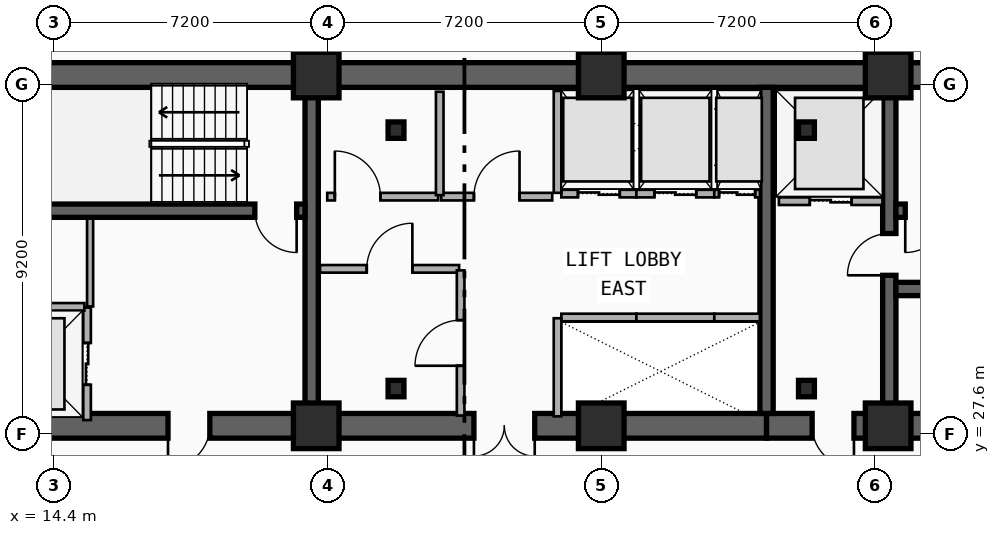
"""IFC4 building model, lengths in metres.
Left out: names, types, materials, properties, quantities, classifications, styles, units other than length and angle.
Written with IfcOpenShell. Run it as: python <this file> out.ifc"""

import sys

from ifc_helpers import new_model, si_unit, direction, frame, frame_2d, origin, origin_2d, place, context, subcontext, project, spatial, rectangle, i_section, extrude, element, fill, save


model = new_model("IFC4")
c1 = context("Model", 3, precision=1e-05, world=origin(), true_north=direction((0.0, 1.0)))
c2 = subcontext(c1, "Body", "Model", "MODEL_VIEW")
j1 = project(units=[si_unit("LENGTHUNIT", "METRE"), si_unit("PLANEANGLEUNIT", "RADIAN")], contexts=[c1])
p1 = place(None, origin())
s1 = spatial("IfcSite", under=j1, at=p1, CompositionType="ELEMENT")
p2 = place(p1, origin())
s2 = spatial("IfcBuilding", under=s1, at=p2, CompositionType="ELEMENT")
p3 = place(p2, frame((0.0, 0.0, 122.3)))
s3 = spatial("IfcBuildingStorey", under=s2, at=p3, CompositionType="ELEMENT", Elevation=122.3)
p4 = place(p3, frame((12.15, 37.05, 0.0), z_axis=(0.0, 0.0, 1.0), x_axis=(1.0, 0.0, 0.0)))
e1 = element("IfcWall", 1, at=p4, inside=s3, PredefinedType="SHEAR", context=c2, shape_type="SweptSolid", body=[
    extrude(rectangle(XDim=33.23, YDim=0.65, at=frame_2d((16.615, 0.0))), origin(), (0.0, 0.0, 1.0), 3.5),
])
p5 = place(p3, frame((21.18, 27.82, 0.0), z_axis=(0.0, 0.0, 1.0), x_axis=(-1.0, 0.0, 0.0)))
e2 = element("IfcWall", 2, at=p5, inside=s3, PredefinedType="SHEAR", context=c2, shape_type="SweptSolid", body=[
    extrude(rectangle(XDim=9.03, YDim=0.65, at=frame_2d((4.515, 0.0))), origin(), (0.0, 0.0, 1.0), 3.5),
])
p6 = place(p5, frame((2.68, 0.0, 0.0)))
e3 = element("IfcOpeningElement", 3, at=p6, cuts=e2, PredefinedType="OPENING", context=c2, shape_type="SweptSolid", body=[
    extrude(rectangle(XDim=1.1, YDim=2.15, at=frame_2d((0.55, 1.075))), frame((0.0, 0.335, 0.0), z_axis=(0.0, -1.0, 0.0), x_axis=(1.0, 0.0, 0.0)), (0.0, 0.0, 1.0), 0.67),
])
p7 = place(p3, frame((33.15, 27.82, 0.0), z_axis=(0.0, 0.0, 1.0), x_axis=(-1.0, 0.0, 0.0)))
e4 = element("IfcWall", 4, at=p7, inside=s3, PredefinedType="SHEAR", context=c2, shape_type="SweptSolid", body=[
    extrude(rectangle(XDim=11.97, YDim=0.65, at=frame_2d((5.985, 0.0))), origin(), (0.0, 0.0, 1.0), 3.5),
])
p8 = place(p7, frame((6.1, 0.0, 0.0)))
e5 = element("IfcOpeningElement", 5, at=p8, cuts=e4, PredefinedType="OPENING", context=c2, shape_type="SweptSolid", body=[
    extrude(rectangle(XDim=1.6, YDim=2.2, at=frame_2d((0.8, 1.1))), frame((0.0, 0.335, 0.0), z_axis=(0.0, -1.0, 0.0), x_axis=(1.0, 0.0, 0.0)), (0.0, 0.0, 1.0), 0.67),
])
p9 = place(p3, frame((45.38, 27.82, 0.0), z_axis=(0.0, 0.0, 1.0), x_axis=(-1.0, 0.0, 0.0)))
e6 = element("IfcWall", 6, at=p9, inside=s3, PredefinedType="SHEAR", context=c2, shape_type="SweptSolid", body=[
    extrude(rectangle(XDim=12.23, YDim=0.65, at=frame_2d((6.115, 0.0))), origin(), (0.0, 0.0, 1.0), 3.5),
])
p10 = place(p9, frame((9.93, 0.0, 0.0)))
e7 = element("IfcOpeningElement", 7, at=p10, cuts=e6, PredefinedType="OPENING", context=c2, shape_type="SweptSolid", body=[
    extrude(rectangle(XDim=1.1, YDim=2.15, at=frame_2d((0.55, 1.075))), frame((0.0, 0.335, 0.0), z_axis=(0.0, -1.0, 0.0), x_axis=(1.0, 0.0, 0.0)), (0.0, 0.0, 1.0), 0.67),
])
p11 = place(p9, frame((6.23, 0.0, 0.0)))
e8 = element("IfcOpeningElement", 8, at=p11, cuts=e6, PredefinedType="OPENING", context=c2, shape_type="SweptSolid", body=[
    extrude(rectangle(XDim=1.1, YDim=2.15, at=frame_2d((0.55, 1.075))), frame((0.0, 0.335, 0.0), z_axis=(0.0, -1.0, 0.0), x_axis=(1.0, 0.0, 0.0)), (0.0, 0.0, 1.0), 0.67),
])
for number, where, z_axis, x_axis in (
    (9, (21.18, 28.145, 0.0), (0.0, 0.0, 1.0), (0.0, 1.0, 0.0)),
    (10, (33.15, 28.145, 0.0), (0.0, 0.0, 1.0), (0.0, 1.0, 0.0)),
):
    element("IfcWall", number, at=place(p3, frame(where, z_axis=z_axis, x_axis=x_axis)), inside=s3, PredefinedType="SHEAR", context=c2, shape_type="SweptSolid", body=[
        extrude(rectangle(XDim=8.58, YDim=0.35, at=frame_2d((4.29, 0.0))), origin(), (0.0, 0.0, 1.0), 3.5),
    ])
p12 = place(p3, frame((36.38, 28.145, 0.0), z_axis=(0.0, 0.0, 1.0), x_axis=(0.0, 1.0, 0.0)))
e11 = element("IfcWall", 11, at=p12, inside=s3, PredefinedType="SHEAR", context=c2, shape_type="SweptSolid", body=[
    extrude(rectangle(XDim=8.58, YDim=0.35, at=frame_2d((4.29, 0.0))), origin(), (0.0, 0.0, 1.0), 3.5),
])
p13 = place(p12, frame((3.635, 0.0, 0.0)))
e12 = element("IfcOpeningElement", 12, at=p13, cuts=e11, PredefinedType="OPENING", context=c2, shape_type="SweptSolid", body=[
    extrude(rectangle(XDim=1.1, YDim=2.15, at=frame_2d((0.55, 1.075))), frame((0.0, 0.185, 0.0), z_axis=(0.0, -1.0, 0.0), x_axis=(1.0, 0.0, 0.0)), (0.0, 0.0, 1.0), 0.37),
])
p14 = place(p3, frame((21.005, 33.48, 0.0), z_axis=(0.0, 0.0, 1.0), x_axis=(-1.0, 0.0, 0.0)))
e13 = element("IfcWall", 13, at=p14, inside=s3, PredefinedType="SHEAR", context=c2, shape_type="SweptSolid", body=[
    extrude(rectangle(XDim=8.53, YDim=0.35, at=frame_2d((4.265, 0.0))), origin(), (0.0, 0.0, 1.0), 3.5),
])
p15 = place(p14, frame((0.22, 0.0, 0.0)))
e14 = element("IfcOpeningElement", 14, at=p15, cuts=e13, PredefinedType="OPENING", context=c2, shape_type="SweptSolid", body=[
    extrude(rectangle(XDim=1.1, YDim=2.15, at=frame_2d((0.55, 1.075))), frame((0.0, 0.185, 0.0), z_axis=(0.0, -1.0, 0.0), x_axis=(1.0, 0.0, 0.0)), (0.0, 0.0, 1.0), 0.37),
])
p16 = place(p3, frame((45.055, 33.48, 0.0), z_axis=(0.0, 0.0, 1.0), x_axis=(-1.0, 0.0, 0.0)))
e15 = element("IfcWall", 15, at=p16, inside=s3, PredefinedType="SHEAR", context=c2, shape_type="SweptSolid", body=[
    extrude(rectangle(XDim=8.5, YDim=0.35, at=frame_2d((4.25, 0.0))), origin(), (0.0, 0.0, 1.0), 3.5),
])
p17 = place(p16, frame((7.155, 0.0, 0.0)))
e16 = element("IfcOpeningElement", 16, at=p17, cuts=e15, PredefinedType="OPENING", context=c2, shape_type="SweptSolid", body=[
    extrude(rectangle(XDim=1.1, YDim=2.15, at=frame_2d((0.55, 1.075))), frame((0.0, 0.185, 0.0), z_axis=(0.0, -1.0, 0.0), x_axis=(1.0, 0.0, 0.0)), (0.0, 0.0, 1.0), 0.37),
])
p18 = place(p3, frame((36.555, 31.42, 0.0), z_axis=(0.0, 0.0, 1.0), x_axis=(1.0, 0.0, 0.0)))
e17 = element("IfcWall", 17, at=p18, inside=s3, PredefinedType="SHEAR", context=c2, shape_type="SweptSolid", body=[
    extrude(rectangle(XDim=8.5, YDim=0.35, at=frame_2d((4.25, 0.0))), origin(), (0.0, 0.0, 1.0), 3.5),
])
for number, where, z_axis, x_axis in (
    (18, (23.4, 28.8, 0.0), (0.0, 0.0, 1.0), (1.0, 0.0, 0.0)),
    (19, (34.2, 28.8, 0.0), (0.0, 0.0, 1.0), (1.0, 0.0, 0.0)),
    (20, (34.2, 35.6, 0.0), (0.0, 0.0, 1.0), (1.0, 0.0, 0.0)),
    (21, (23.4, 35.6, 0.0), (0.0, 0.0, 1.0), (1.0, 0.0, 0.0)),
):
    element("IfcColumn", number, at=place(p3, frame(where, z_axis=z_axis, x_axis=x_axis)), inside=s3, PredefinedType="COLUMN", context=c2, shape_type="SweptSolid", body=[
        extrude(i_section(OverallWidth=0.418, OverallDepth=0.432, WebThickness=0.035, FlangeThickness=0.056, FilletRadius=0.015, at=origin_2d()), origin(), (0.0, 0.0, 1.0), 3.5),
    ])
for number, where, z_axis, x_axis in (
    (22, (21.3, 27.82, 0.0), (0.0, 0.0, 1.0), (1.0, 0.0, 0.0)),
    (23, (21.3, 37.05, 0.0), (0.0, 0.0, 1.0), (1.0, 0.0, 0.0)),
    (24, (28.8, 27.82, 0.0), (0.0, 0.0, 1.0), (1.0, 0.0, 0.0)),
    (25, (28.8, 37.05, 0.0), (0.0, 0.0, 1.0), (1.0, 0.0, 0.0)),
    (26, (36.35, 27.82, 0.0), (0.0, 0.0, 1.0), (1.0, 0.0, 0.0)),
    (27, (36.35, 37.05, 0.0), (0.0, 0.0, 1.0), (1.0, 0.0, 0.0)),
):
    element("IfcColumn", number, at=place(p3, frame(where, z_axis=z_axis, x_axis=x_axis)), inside=s3, PredefinedType="COLUMN", context=c2, shape_type="SweptSolid", body=[
        extrude(rectangle(XDim=1.2, YDim=1.2, at=origin_2d()), origin(), (0.0, 0.0, 1.0), 3.5),
    ])
p19 = place(p3, frame((15.27, 27.97, 0.0), z_axis=(0.0, 0.0, 1.0), x_axis=(0.0, 1.0, 0.0)))
e28 = element("IfcWall", 28, at=p19, inside=s3, PredefinedType="PARTITIONING", context=c2, shape_type="SweptSolid", body=[
    extrude(rectangle(XDim=2.96, YDim=0.2, at=frame_2d((1.48, 0.0))), origin(), (0.0, 0.0, 1.0), 2.212),
])
p20 = place(p19, frame((0.93, 0.0, 0.0)))
e29 = element("IfcOpeningElement", 29, at=p20, cuts=e28, PredefinedType="OPENING", context=c2, shape_type="SweptSolid", body=[
    extrude(rectangle(XDim=1.1, YDim=2.15, at=frame_2d((0.55, 1.075))), frame((0.0, 0.11, 0.0), z_axis=(0.0, -1.0, 0.0), x_axis=(1.0, 0.0, 0.0)), (0.0, 0.0, 1.0), 0.22),
])
p21 = place(p3, frame((12.45, 30.95, 0.0), z_axis=(0.0, 0.0, 1.0), x_axis=(1.0, 0.0, 0.0)))
e30 = element("IfcWall", 30, at=p21, inside=s3, PredefinedType="PARTITIONING", context=c2, shape_type="SweptSolid", body=[
    extrude(rectangle(XDim=2.75, YDim=0.2, at=frame_2d((1.375, 0.0))), origin(), (0.0, 0.0, 1.0), 2.212),
])
p22 = place(p3, frame((33.475, 33.73, 0.0), z_axis=(0.0, 0.0, 1.0), x_axis=(1.0, 0.0, 0.0)))
e31 = element("IfcWall", 31, at=p22, inside=s3, PredefinedType="PARTITIONING", context=c2, shape_type="SweptSolid", body=[
    extrude(rectangle(XDim=2.725, YDim=0.2, at=frame_2d((1.362, 0.0))), origin(), (0.0, 0.0, 1.0), 2.212),
])
p23 = place(p22, frame((0.812, 0.0, 0.0)))
e32 = element("IfcOpeningElement", 32, at=p23, cuts=e31, PredefinedType="OPENING", context=c2, shape_type="SweptSolid", body=[
    extrude(rectangle(XDim=1.1, YDim=2.15, at=frame_2d((0.55, 1.075))), frame((0.0, 0.11, 0.0), z_axis=(0.0, -1.0, 0.0), x_axis=(1.0, 0.0, 0.0)), (0.0, 0.0, 1.0), 0.22),
])
p24 = place(p3, frame((27.75, 30.67, 0.0), z_axis=(0.0, 0.0, 1.0), x_axis=(1.0, 0.0, 0.0)))
e33 = element("IfcWall", 33, at=p24, inside=s3, PredefinedType="PARTITIONING", context=c2, shape_type="SweptSolid", body=[
    extrude(rectangle(XDim=1.975, YDim=0.2, at=frame_2d((0.988, 0.0))), origin(), (0.0, 0.0, 1.0), 2.212),
])
p25 = place(p3, frame((27.65, 28.07, 0.0), z_axis=(0.0, 0.0, 1.0), x_axis=(0.0, 1.0, 0.0)))
e34 = element("IfcWall", 34, at=p25, inside=s3, PredefinedType="PARTITIONING", context=c2, shape_type="SweptSolid", body=[
    extrude(rectangle(XDim=2.58, YDim=0.2, at=frame_2d((1.29, 0.0))), origin(), (0.0, 0.0, 1.0), 2.212),
])
p26 = place(p3, frame((29.725, 30.67, 0.0), z_axis=(0.0, 0.0, 1.0), x_axis=(1.0, 0.0, 0.0)))
e35 = element("IfcWall", 35, at=p26, inside=s3, PredefinedType="PARTITIONING", context=c2, shape_type="SweptSolid", body=[
    extrude(rectangle(XDim=2.05, YDim=0.2, at=frame_2d((1.025, 0.0))), origin(), (0.0, 0.0, 1.0), 2.62),
])
p27 = place(p3, frame((31.775, 30.67, 0.0), z_axis=(0.0, 0.0, 1.0), x_axis=(1.0, 0.0, 0.0)))
e36 = element("IfcWall", 36, at=p27, inside=s3, PredefinedType="PARTITIONING", context=c2, shape_type="SweptSolid", body=[
    extrude(rectangle(XDim=1.2, YDim=0.2, at=frame_2d((0.6, 0.0))), origin(), (0.0, 0.0, 1.0), 2.62),
])
p28 = place(p3, frame((27.75, 33.93, 0.0), z_axis=(0.0, 0.0, 1.0), x_axis=(1.0, 0.0, 0.0)))
e37 = element("IfcWall", 37, at=p28, inside=s3, PredefinedType="PARTITIONING", context=c2, shape_type="SweptSolid", body=[
    extrude(rectangle(XDim=1.975, YDim=0.2, at=frame_2d((0.988, 0.0))), origin(), (0.0, 0.0, 1.0), 2.212),
])
p29 = place(p28, frame((0.438, 0.0, 0.0)))
e38 = element("IfcOpeningElement", 38, at=p29, cuts=e37, PredefinedType="OPENING", context=c2, shape_type="SweptSolid", body=[
    extrude(rectangle(XDim=1.1, YDim=2.15, at=frame_2d((0.55, 1.075))), frame((0.0, 0.11, 0.0), z_axis=(0.0, -1.0, 0.0), x_axis=(1.0, 0.0, 0.0)), (0.0, 0.0, 1.0), 0.22),
])
p30 = place(p3, frame((27.65, 33.95, 0.0), z_axis=(0.0, 0.0, 1.0), x_axis=(0.0, 1.0, 0.0)))
e39 = element("IfcWall", 39, at=p30, inside=s3, PredefinedType="PARTITIONING", context=c2, shape_type="SweptSolid", body=[
    extrude(rectangle(XDim=2.68, YDim=0.2, at=frame_2d((1.34, 0.0))), origin(), (0.0, 0.0, 1.0), 2.212),
])
p31 = place(p3, frame((29.725, 33.93, 0.0), z_axis=(0.0, 0.0, 1.0), x_axis=(1.0, 0.0, 0.0)))
e40 = element("IfcWall", 40, at=p31, inside=s3, PredefinedType="PARTITIONING", context=c2, shape_type="SweptSolid", body=[
    extrude(rectangle(XDim=2.05, YDim=0.2, at=frame_2d((1.025, 0.0))), origin(), (0.0, 0.0, 1.0), 3.24),
])
p32 = place(p31, frame((0.475, 0.0, 0.0)))
e41 = element("IfcOpeningElement", 41, at=p32, cuts=e40, PredefinedType="OPENING", context=c2, shape_type="SweptSolid", body=[
    extrude(rectangle(XDim=1.1, YDim=2.15, at=frame_2d((0.55, 1.075))), frame((0.0, 0.11, 0.0), z_axis=(0.0, -1.0, 0.0), x_axis=(1.0, 0.0, 0.0)), (0.0, 0.0, 1.0), 0.22),
])
p33 = place(p3, frame((31.775, 33.93, 0.0), z_axis=(0.0, 0.0, 1.0), x_axis=(1.0, 0.0, 0.0)))
e42 = element("IfcWall", 42, at=p33, inside=s3, PredefinedType="PARTITIONING", context=c2, shape_type="SweptSolid", body=[
    extrude(rectangle(XDim=1.2, YDim=0.2, at=frame_2d((0.6, 0.0))), origin(), (0.0, 0.0, 1.0), 3.24),
])
p34 = place(p33, frame((0.125, 0.0, 0.0)))
e43 = element("IfcOpeningElement", 43, at=p34, cuts=e42, PredefinedType="OPENING", context=c2, shape_type="SweptSolid", body=[
    extrude(rectangle(XDim=0.95, YDim=2.15, at=frame_2d((0.475, 1.075))), frame((0.0, 0.11, 0.0), z_axis=(0.0, -1.0, 0.0), x_axis=(1.0, 0.0, 0.0)), (0.0, 0.0, 1.0), 0.22),
])
p35 = place(p3, frame((21.4, 31.95, 0.0), z_axis=(0.0, 0.0, 1.0), x_axis=(1.0, 0.0, 0.0)))
e44 = element("IfcWall", 44, at=p35, inside=s3, PredefinedType="PARTITIONING", context=c2, shape_type="SweptSolid", body=[
    extrude(rectangle(XDim=3.66, YDim=0.2, at=frame_2d((1.83, 0.0))), origin(), (0.0, 0.0, 1.0), 2.28),
])
p36 = place(p35, frame((1.23, 0.0, 0.0)))
e45 = element("IfcOpeningElement", 45, at=p36, cuts=e44, PredefinedType="OPENING", context=c2, shape_type="SweptSolid", body=[
    extrude(rectangle(XDim=1.2, YDim=2.15, at=frame_2d((0.6, 1.075))), frame((0.0, 0.11, 0.0), z_axis=(0.0, -1.0, 0.0), x_axis=(1.0, 0.0, 0.0)), (0.0, 0.0, 1.0), 0.22),
])
p37 = place(p3, frame((21.59, 33.85, 0.0), z_axis=(0.0, 0.0, 1.0), x_axis=(1.0, 0.0, 0.0)))
e46 = element("IfcWall", 46, at=p37, inside=s3, PredefinedType="PARTITIONING", context=c2, shape_type="SweptSolid", body=[
    extrude(rectangle(XDim=2.92, YDim=0.2, at=frame_2d((1.46, 0.0))), origin(), (0.0, 0.0, 1.0), 2.28),
])
p38 = place(p37, frame((0.2, 0.0, 0.0)))
e47 = element("IfcOpeningElement", 47, at=p38, cuts=e46, PredefinedType="OPENING", context=c2, shape_type="SweptSolid", body=[
    extrude(rectangle(XDim=1.2, YDim=2.15, at=frame_2d((0.6, 1.075))), frame((0.0, 0.11, 0.0), z_axis=(0.0, -1.0, 0.0), x_axis=(1.0, 0.0, 0.0)), (0.0, 0.0, 1.0), 0.22),
])
p39 = place(p3, frame((24.59, 33.85, 0.0), z_axis=(0.0, 0.0, 1.0), x_axis=(1.0, 0.0, 0.0)))
e48 = element("IfcWall", 48, at=p39, inside=s3, PredefinedType="PARTITIONING", context=c2, shape_type="SweptSolid", body=[
    extrude(rectangle(XDim=2.92, YDim=0.2, at=frame_2d((1.46, 0.0))), origin(), (0.0, 0.0, 1.0), 3.24),
])
p40 = place(p39, frame((0.86, 0.0, 0.0)))
e49 = element("IfcOpeningElement", 49, at=p40, cuts=e48, PredefinedType="OPENING", context=c2, shape_type="SweptSolid", body=[
    extrude(rectangle(XDim=1.2, YDim=2.15, at=frame_2d((0.6, 1.075))), frame((0.0, 0.11, 0.0), z_axis=(0.0, -1.0, 0.0), x_axis=(1.0, 0.0, 0.0)), (0.0, 0.0, 1.0), 0.22),
])
p41 = place(p3, frame((25.1, 28.09, 0.0), z_axis=(0.0, 0.0, 1.0), x_axis=(0.0, 1.0, 0.0)))
e50 = element("IfcWall", 50, at=p41, inside=s3, PredefinedType="PARTITIONING", context=c2, shape_type="SweptSolid", body=[
    extrude(rectangle(XDim=3.82, YDim=0.2, at=frame_2d((1.91, 0.0))), origin(), (0.0, 0.0, 1.0), 2.62),
])
p42 = place(p41, frame((1.31, 0.0, 0.0)))
e51 = element("IfcOpeningElement", 51, at=p42, cuts=e50, PredefinedType="OPENING", context=c2, shape_type="SweptSolid", body=[
    extrude(rectangle(XDim=1.2, YDim=2.15, at=frame_2d((0.6, 1.075))), frame((0.0, 0.11, 0.0), z_axis=(0.0, -1.0, 0.0), x_axis=(1.0, 0.0, 0.0)), (0.0, 0.0, 1.0), 0.22),
])
p43 = place(p3, frame((24.55, 33.89, 0.0), z_axis=(0.0, 0.0, 1.0), x_axis=(0.0, 1.0, 0.0)))
e52 = element("IfcWall", 52, at=p43, inside=s3, PredefinedType="PARTITIONING", context=c2, shape_type="SweptSolid", body=[
    extrude(rectangle(XDim=2.72, YDim=0.2, at=frame_2d((1.36, 0.0))), origin(), (0.0, 0.0, 1.0), 3.24),
])
p44 = place(p3, frame((15.35, 30.96, 0.0), z_axis=(0.0, 0.0, 1.0), x_axis=(0.0, 1.0, 0.0)))
e53 = element("IfcWall", 53, at=p44, inside=s3, PredefinedType="PARTITIONING", context=c2, shape_type="SweptSolid", body=[
    extrude(rectangle(XDim=2.31, YDim=0.16, at=frame_2d((1.155, 0.0))), origin(), (0.0, 0.0, 1.0), 3.24),
])
p45 = place(p20, origin())
e54 = element("IfcDoor", 54, at=p45, inside=s3, OperationType="DOUBLE_DOOR_SLIDING", PredefinedType="DOOR", context=c2, shape_type="SweptSolid", body=[
    extrude(rectangle(XDim=1.1, YDim=2.15, at=frame_2d((0.55, 1.075))), frame((0.0, 0.025, 0.0), z_axis=(0.0, -1.0, 0.0), x_axis=(1.0, 0.0, 0.0)), (0.0, 0.0, 1.0), 0.05),
])
fill(e29, e54)
p46 = place(p23, origin())
e55 = element("IfcDoor", 55, at=p46, inside=s3, OperationType="DOUBLE_DOOR_SLIDING", PredefinedType="DOOR", context=c2, shape_type="SweptSolid", body=[
    extrude(rectangle(XDim=1.1, YDim=2.15, at=frame_2d((0.55, 1.075))), frame((0.0, 0.025, 0.0), z_axis=(0.0, -1.0, 0.0), x_axis=(1.0, 0.0, 0.0)), (0.0, 0.0, 1.0), 0.05),
])
fill(e32, e55)
p47 = place(p29, origin())
e56 = element("IfcDoor", 56, at=p47, inside=s3, OperationType="DOUBLE_DOOR_SLIDING", PredefinedType="DOOR", context=c2, shape_type="SweptSolid", body=[
    extrude(rectangle(XDim=1.1, YDim=2.15, at=frame_2d((0.55, 1.075))), frame((0.0, 0.025, 0.0), z_axis=(0.0, -1.0, 0.0), x_axis=(1.0, 0.0, 0.0)), (0.0, 0.0, 1.0), 0.05),
])
fill(e38, e56)
p48 = place(p32, origin())
e57 = element("IfcDoor", 57, at=p48, inside=s3, OperationType="DOUBLE_DOOR_SLIDING", PredefinedType="DOOR", context=c2, shape_type="SweptSolid", body=[
    extrude(rectangle(XDim=1.1, YDim=2.15, at=frame_2d((0.55, 1.075))), frame((0.0, 0.025, 0.0), z_axis=(0.0, -1.0, 0.0), x_axis=(1.0, 0.0, 0.0)), (0.0, 0.0, 1.0), 0.05),
])
fill(e41, e57)
p49 = place(p34, origin())
e58 = element("IfcDoor", 58, at=p49, inside=s3, OperationType="DOUBLE_DOOR_SLIDING", PredefinedType="DOOR", context=c2, shape_type="SweptSolid", body=[
    extrude(rectangle(XDim=0.95, YDim=2.15, at=frame_2d((0.475, 1.075))), frame((0.0, 0.025, 0.0), z_axis=(0.0, -1.0, 0.0), x_axis=(1.0, 0.0, 0.0)), (0.0, 0.0, 1.0), 0.05),
])
fill(e43, e58)
p50 = place(p15, origin())
e59 = element("IfcDoor", 59, at=p50, inside=s3, OperationType="SINGLE_SWING_LEFT", PredefinedType="DOOR", context=c2, shape_type="SweptSolid", body=[
    extrude(rectangle(XDim=1.1, YDim=2.15, at=frame_2d((0.55, 1.075))), frame((0.0, 0.025, 0.0), z_axis=(0.0, -1.0, 0.0), x_axis=(1.0, 0.0, 0.0)), (0.0, 0.0, 1.0), 0.05),
])
fill(e14, e59)
p51 = place(p6, origin())
e60 = element("IfcDoor", 60, at=p51, inside=s3, OperationType="SINGLE_SWING_RIGHT", PredefinedType="DOOR", context=c2, shape_type="SweptSolid", body=[
    extrude(rectangle(XDim=1.1, YDim=2.15, at=frame_2d((0.55, 1.075))), frame((0.0, 0.025, 0.0), z_axis=(0.0, -1.0, 0.0), x_axis=(1.0, 0.0, 0.0)), (0.0, 0.0, 1.0), 0.05),
])
fill(e3, e60)
p52 = place(p17, origin())
e61 = element("IfcDoor", 61, at=p52, inside=s3, OperationType="SINGLE_SWING_RIGHT", PredefinedType="DOOR", context=c2, shape_type="SweptSolid", body=[
    extrude(rectangle(XDim=1.1, YDim=2.15, at=frame_2d((0.55, 1.075))), frame((0.0, 0.025, 0.0), z_axis=(0.0, -1.0, 0.0), x_axis=(1.0, 0.0, 0.0)), (0.0, 0.0, 1.0), 0.05),
])
fill(e16, e61)
p53 = place(p13, origin())
e62 = element("IfcDoor", 62, at=p53, inside=s3, OperationType="SINGLE_SWING_LEFT", PredefinedType="DOOR", context=c2, shape_type="SweptSolid", body=[
    extrude(rectangle(XDim=1.1, YDim=2.15, at=frame_2d((0.55, 1.075))), frame((0.0, 0.025, 0.0), z_axis=(0.0, -1.0, 0.0), x_axis=(1.0, 0.0, 0.0)), (0.0, 0.0, 1.0), 0.05),
])
fill(e12, e62)
p54 = place(p10, origin())
e63 = element("IfcDoor", 63, at=p54, inside=s3, OperationType="SINGLE_SWING_LEFT", PredefinedType="DOOR", context=c2, shape_type="SweptSolid", body=[
    extrude(rectangle(XDim=1.1, YDim=2.15, at=frame_2d((0.55, 1.075))), frame((0.0, 0.025, 0.0), z_axis=(0.0, -1.0, 0.0), x_axis=(1.0, 0.0, 0.0)), (0.0, 0.0, 1.0), 0.05),
])
fill(e7, e63)
p55 = place(p8, origin())
e64 = element("IfcDoor", 64, at=p55, inside=s3, OperationType="SINGLE_SWING_LEFT", PredefinedType="DOOR", context=c2, shape_type="SweptSolid", body=[
    extrude(rectangle(XDim=1.6, YDim=2.2, at=frame_2d((0.8, 1.1))), frame((0.0, 0.025, 0.0), z_axis=(0.0, -1.0, 0.0), x_axis=(1.0, 0.0, 0.0)), (0.0, 0.0, 1.0), 0.05),
])
fill(e5, e64)
p56 = place(p36, origin())
e65 = element("IfcDoor", 65, at=p56, inside=s3, OperationType="SINGLE_SWING_RIGHT", PredefinedType="DOOR", context=c2, shape_type="SweptSolid", body=[
    extrude(rectangle(XDim=1.2, YDim=2.15, at=frame_2d((0.6, 1.075))), frame((0.0, 0.025, 0.0), z_axis=(0.0, -1.0, 0.0), x_axis=(1.0, 0.0, 0.0)), (0.0, 0.0, 1.0), 0.05),
])
fill(e45, e65)
p57 = place(p38, origin())
e66 = element("IfcDoor", 66, at=p57, inside=s3, OperationType="SINGLE_SWING_LEFT", PredefinedType="DOOR", context=c2, shape_type="SweptSolid", body=[
    extrude(rectangle(XDim=1.2, YDim=2.15, at=frame_2d((0.6, 1.075))), frame((0.0, 0.025, 0.0), z_axis=(0.0, -1.0, 0.0), x_axis=(1.0, 0.0, 0.0)), (0.0, 0.0, 1.0), 0.05),
])
fill(e47, e66)
p58 = place(p40, origin())
e67 = element("IfcDoor", 67, at=p58, inside=s3, OperationType="SINGLE_SWING_RIGHT", PredefinedType="DOOR", context=c2, shape_type="SweptSolid", body=[
    extrude(rectangle(XDim=1.2, YDim=2.15, at=frame_2d((0.6, 1.075))), frame((0.0, 0.025, 0.0), z_axis=(0.0, -1.0, 0.0), x_axis=(1.0, 0.0, 0.0)), (0.0, 0.0, 1.0), 0.05),
])
fill(e49, e67)
p59 = place(p42, origin())
e68 = element("IfcDoor", 68, at=p59, inside=s3, OperationType="SINGLE_SWING_LEFT", PredefinedType="DOOR", context=c2, shape_type="SweptSolid", body=[
    extrude(rectangle(XDim=1.2, YDim=2.15, at=frame_2d((0.6, 1.075))), frame((0.0, 0.025, 0.0), z_axis=(0.0, -1.0, 0.0), x_axis=(1.0, 0.0, 0.0)), (0.0, 0.0, 1.0), 0.05),
])
fill(e51, e68)
save(model, sys.argv[1])
